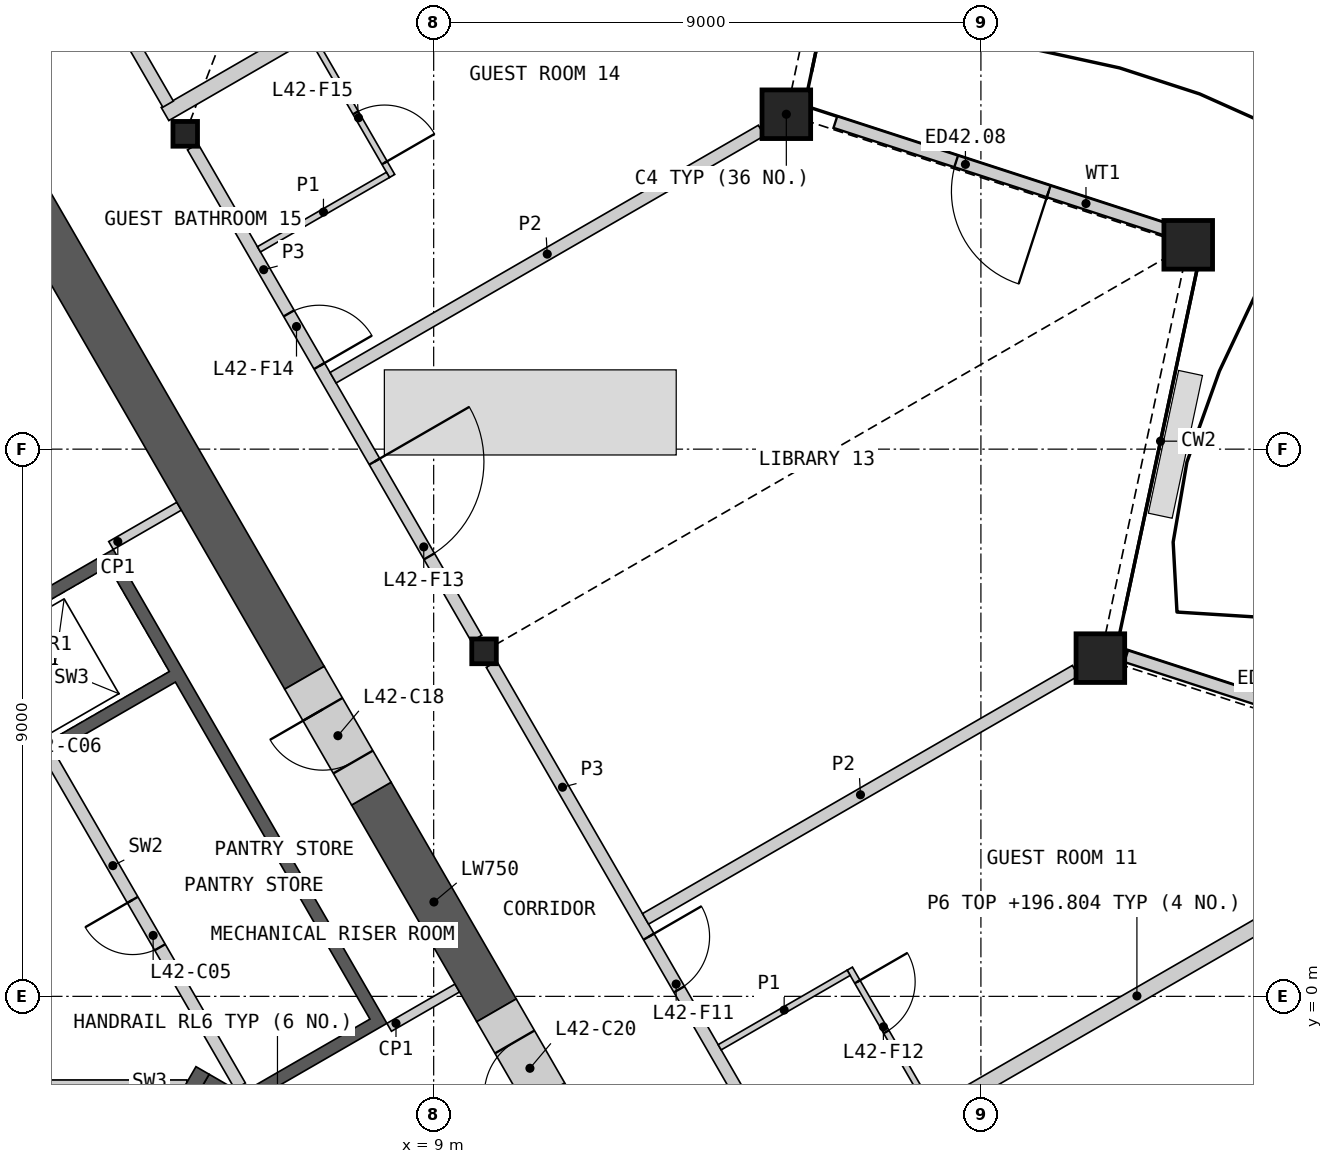
"""IFC4 building model, lengths in metres.
Left out: names, types, materials, properties, quantities, classifications, styles, units other than length and angle.
Written with IfcOpenShell. Run it as: python <this file> out.ifc"""

import sys

from ifc_helpers import new_model, si_unit, direction, frame, frame_2d, origin, origin_2d, place, context, subcontext, project, spatial, polyline, rectangle, hollow_rectangle, i_section, outline, extrude, element, fill, save


model = new_model("IFC4")
c1 = context("Model", 3, precision=1e-05, world=origin(), true_north=direction((0.0, 1.0)))
c2 = subcontext(c1, "Body", "Model", "MODEL_VIEW")
j1 = project(units=[si_unit("LENGTHUNIT", "METRE"), si_unit("PLANEANGLEUNIT", "RADIAN")], contexts=[c1])
p1 = place(None, origin())
s1 = spatial("IfcSite", under=j1, at=p1, CompositionType="ELEMENT")
p2 = place(p1, origin())
s2 = spatial("IfcBuilding", under=s1, at=p2, CompositionType="ELEMENT")
p3 = place(p2, frame((0.0, 0.0, 194.4)))
s3 = spatial("IfcBuildingStorey", under=s2, at=p3, CompositionType="ELEMENT", Elevation=194.4)
for number, where, z_axis, x_axis in (
    (1, (19.965, 5.563, 0.0), (0.0, 0.0, 1.0), (1.0, 0.0, 0.0)),
    (2, (21.409, 12.361, 0.0), (0.0, 0.0, 1.0), (1.0, 0.0, 0.0)),
    (3, (14.8, 14.508, 0.0), (0.0, 0.0, 1.0), (1.0, 0.0, 0.0)),
):
    element("IfcColumn", number, at=place(p3, frame(where, z_axis=z_axis, x_axis=x_axis)), inside=s3, PredefinedType="COLUMN", context=c2, shape_type="SweptSolid", body=[
        extrude(hollow_rectangle(XDim=0.8, YDim=0.8, WallThickness=0.05, at=origin_2d()), origin(), (0.0, 0.0, 1.0), 3.6),
    ])
for number, where, z_axis, x_axis in (
    (4, (9.828, 5.675, 0.0), (0.0, 0.0, 1.0), (1.0, 0.0, 0.0)),
    (5, (4.914, 14.186, 0.0), (0.0, 0.0, 1.0), (1.0, 0.0, 0.0)),
):
    element("IfcColumn", number, at=place(p3, frame(where, z_axis=z_axis, x_axis=x_axis)), inside=s3, PredefinedType="COLUMN", context=c2, shape_type="SweptSolid", body=[
        extrude(i_section(OverallWidth=0.404, OverallDepth=0.407, WebThickness=0.027, FlangeThickness=0.044, at=origin_2d()), origin(), (0.0, 0.0, 1.0), 3.6),
    ])
p4 = place(p3, frame((26.24, 3.693, 0.0), z_axis=(0.0, 0.0, 1.0), x_axis=(-0.951053023356, 0.30902774433, 0.0)))
e6 = element("IfcWall", 6, at=p4, inside=s3, PredefinedType="SOLIDWALL", context=c2, shape_type="SweptSolid", body=[
    extrude(rectangle(XDim=6.152, YDim=0.2, at=frame_2d((3.076, 0.0))), origin(), (0.0, 0.0, 1.0), 2.701),
])
p5 = place(p4, frame((2.089, 0.0, 0.0)))
e7 = element("IfcOpeningElement", 7, at=p5, cuts=e6, PredefinedType="OPENING", context=c2, shape_type="SweptSolid", body=[
    extrude(rectangle(XDim=1.6, YDim=2.4, at=frame_2d((0.8, 1.2))), frame((0.0, 0.11, 0.0), z_axis=(0.0, -1.0, 0.0), x_axis=(1.0, 0.0, 0.0)), (0.0, 0.0, 1.0), 0.22),
])
p6 = place(p3, frame((21.102, 12.593, 0.0), z_axis=(0.0, 0.0, 1.0), x_axis=(-0.951059834965, 0.309006780371, 0.0)))
e8 = element("IfcWall", 8, at=p6, inside=s3, PredefinedType="SOLIDWALL", context=c2, shape_type="SweptSolid", body=[
    extrude(rectangle(XDim=5.779, YDim=0.2, at=frame_2d((2.889, 0.0))), origin(), (0.0, 0.0, 1.0), 2.701),
])
p7 = place(p6, frame((2.089, 0.0, 0.0)))
e9 = element("IfcOpeningElement", 9, at=p7, cuts=e8, PredefinedType="OPENING", context=c2, shape_type="SweptSolid", body=[
    extrude(rectangle(XDim=1.6, YDim=2.4, at=frame_2d((0.8, 1.2))), frame((0.0, 0.11, 0.0), z_axis=(0.0, -1.0, 0.0), x_axis=(1.0, 0.0, 0.0)), (0.0, 0.0, 1.0), 0.22),
])
p8 = place(p3, origin())
e10 = element("IfcWall", 10, at=p8, inside=s3, PredefinedType="SHEAR", context=c2, shape_type="SweptSolid", body=[
    extrude(outline(polyline([(1.561, 6.097), (3.731, 7.35), (8.231, -0.444), (6.061, -1.697), (5.96, -1.524), (7.952, -0.374), (4.752, 5.169), (2.76, 4.019), (2.66, 4.192), (4.652, 5.342), (3.652, 7.074), (1.66, 5.924), (1.561, 6.097)])), origin(), (0.0, 0.0, 1.0), 3.25),
])
p9 = place(p3, frame((5.817, -1.476, 0.0), z_axis=(0.0, 0.0, 1.0), x_axis=(-0.500002616675, 0.866023893041, 0.0)))
e11 = element("IfcWall", 11, at=p9, inside=s3, PredefinedType="SOLIDWALL", context=c2, shape_type="SweptSolid", body=[
    extrude(rectangle(XDim=8.373, YDim=0.2, at=frame_2d((4.187, 0.0))), origin(), (0.0, 0.0, 1.0), 3.25),
])
p10 = place(p9, frame((2.637, 0.0, 0.0)))
e12 = element("IfcOpeningElement", 12, at=p10, cuts=e11, PredefinedType="OPENING", context=c2, shape_type="SweptSolid", body=[
    extrude(rectangle(XDim=0.9, YDim=2.1, at=frame_2d((0.45, 1.05))), frame((0.0, 0.11, 0.0), z_axis=(0.0, -1.0, 0.0), x_axis=(1.0, 0.0, 0.0)), (0.0, 0.0, 1.0), 0.22),
])
p11 = place(p9, frame((6.937, 0.0, 0.0)))
e13 = element("IfcOpeningElement", 13, at=p11, cuts=e11, PredefinedType="OPENING", context=c2, shape_type="SweptSolid", body=[
    extrude(rectangle(XDim=1.1, YDim=2.1, at=frame_2d((0.55, 1.05))), frame((0.0, 0.11, 0.0), z_axis=(0.0, -1.0, 0.0), x_axis=(1.0, 0.0, 0.0)), (0.0, 0.0, 1.0), 0.22),
])
p12 = place(p3, frame((-4.941, -1.45, 0.0), z_axis=(0.0, 0.0, 1.0), x_axis=(1.0, 0.0, 0.0)))
e14 = element("IfcWall", 14, at=p12, inside=s3, PredefinedType="PARTITIONING", context=c2, shape_type="SweptSolid", body=[
    extrude(rectangle(XDim=9.882, YDim=0.15, at=frame_2d((4.941, 0.0))), origin(), (0.0, 0.0, 1.0), 3.25),
])
p13 = place(p12, frame((4.391, 0.0, 0.0)))
e15 = element("IfcOpeningElement", 15, at=p13, cuts=e14, PredefinedType="OPENING", context=c2, shape_type="SweptSolid", body=[
    extrude(rectangle(XDim=1.1, YDim=2.1, at=frame_2d((0.55, 1.05))), frame((0.0, 0.085, 0.0), z_axis=(0.0, -1.0, 0.0), x_axis=(1.0, 0.0, 0.0)), (0.0, 0.0, 1.0), 0.17),
])
p14 = place(p3, origin())
e16 = element("IfcWall", 16, at=p14, inside=s3, PredefinedType="SHEAR", context=c2, shape_type="SweptSolid", body=[
    extrude(outline(polyline([(10.032, -4.298), (10.374, -4.206), (5.307, -1.281), (5.182, -1.498), (10.032, -4.298)])), origin(), (0.0, 0.0, 1.0), 3.25),
])
p15 = place(p3, frame((3.655, -3.893, 0.0), z_axis=(0.0, 0.0, 1.0), x_axis=(0.499982516597, 0.866035497597, 0.0)))
e17 = element("IfcWall", 17, at=p15, inside=s3, PredefinedType="SHEAR", context=c2, shape_type="SweptSolid", body=[
    extrude(rectangle(XDim=3.088, YDim=0.25, at=frame_2d((1.544, 0.0))), origin(), (0.0, 0.0, 1.0), 3.25),
])
p16 = place(p15, frame((0.994, 0.0, 0.0)))
e18 = element("IfcOpeningElement", 18, at=p16, cuts=e17, PredefinedType="OPENING", context=c2, shape_type="SweptSolid", body=[
    extrude(rectangle(XDim=1.1, YDim=2.1, at=frame_2d((0.55, 1.05))), frame((0.0, 0.135, 0.0), z_axis=(0.0, -1.0, 0.0), x_axis=(1.0, 0.0, 0.0)), (0.0, 0.0, 1.0), 0.27),
])
for number, where, z_axis, x_axis in (
    (19, (3.693, 7.415, 0.0), (0.0, 0.0, 1.0), (0.866, 0.5, 0.0)),
    (20, (8.268, -0.509, 0.0), (0.0, 0.0, 1.0), (0.866, 0.5, 0.0)),
):
    element("IfcWall", number, at=place(p3, frame(where, z_axis=z_axis, x_axis=x_axis)), inside=s3, PredefinedType="PARTITIONING", context=c2, shape_type="SweptSolid", body=[
        extrude(rectangle(XDim=1.293, YDim=0.15, at=frame_2d((0.646, 0.0))), origin(), (0.0, 0.0, 1.0), 3.25),
    ])
p17 = place(p3, frame((6.875, 5.24, 0.0), z_axis=(0.0, 0.0, 1.0), x_axis=(-0.499997217876, 0.866027010039, 0.0)))
e21 = element("IfcWall", 21, at=p17, inside=s3, PredefinedType="SHEAR", context=c2, shape_type="SweptSolid", body=[
    extrude(rectangle(XDim=13.101, YDim=0.75, at=frame_2d((6.551, 0.0))), origin(), (0.0, 0.0, 1.0), 3.25),
])
p18 = place(p3, frame((10.033, -0.23, 0.0), z_axis=(0.0, 0.0, 1.0), x_axis=(-0.500030520673, 0.866007781949, 0.0)))
e22 = element("IfcWall", 22, at=p18, inside=s3, PredefinedType="SHEAR", context=c2, shape_type="SweptSolid", body=[
    extrude(rectangle(XDim=4.116, YDim=0.75, at=frame_2d((2.058, 0.0))), origin(), (0.0, 0.0, 1.0), 3.25),
])
p19 = place(p3, frame((7.975, 3.334, 0.0), z_axis=(0.0, 0.0, 1.0), x_axis=(-0.500077893725, 0.86598042715, 0.0)))
e23 = element("IfcWall", 23, at=p19, inside=s3, PredefinedType="SHEAR", context=c2, shape_type="SweptSolid", body=[
    extrude(rectangle(XDim=2.2, YDim=0.75, at=frame_2d((1.1, 0.0))), origin(), (0.0, 0.0, 1.0), 3.25),
])
p20 = place(p19, frame((0.6, 0.0, 0.0)))
e24 = element("IfcOpeningElement", 24, at=p20, cuts=e23, PredefinedType="OPENING", context=c2, shape_type="SweptSolid", body=[
    extrude(rectangle(XDim=1.0, YDim=2.1, at=frame_2d((0.5, 1.05))), frame((0.0, 0.385, 0.0), z_axis=(0.0, -1.0, 0.0), x_axis=(1.0, 0.0, 0.0)), (0.0, 0.0, 1.0), 0.77),
])
p21 = place(p3, frame((11.133, -2.135, 0.0), z_axis=(0.0, 0.0, 1.0), x_axis=(-0.499981787252, 0.866035918664, 0.0)))
e25 = element("IfcWall", 25, at=p21, inside=s3, PredefinedType="SHEAR", context=c2, shape_type="SweptSolid", body=[
    extrude(rectangle(XDim=2.2, YDim=0.75, at=frame_2d((1.1, 0.0))), origin(), (0.0, 0.0, 1.0), 3.25),
])
p22 = place(p21, frame((0.6, 0.0, 0.0)))
e26 = element("IfcOpeningElement", 26, at=p22, cuts=e25, PredefinedType="OPENING", context=c2, shape_type="SweptSolid", body=[
    extrude(rectangle(XDim=1.0, YDim=2.1, at=frame_2d((0.5, 1.05))), frame((0.0, 0.385, 0.0), z_axis=(0.0, -1.0, 0.0), x_axis=(1.0, 0.0, 0.0)), (0.0, 0.0, 1.0), 0.77),
])
p23 = place(p3, frame((14.967, -3.226, 0.0), z_axis=(0.0, 0.0, 1.0), x_axis=(0.866030250269, 0.499991605548, 0.0)))
e27 = element("IfcWall", 27, at=p23, inside=s3, PredefinedType="PARTITIONING", context=c2, shape_type="SweptSolid", body=[
    extrude(rectangle(XDim=12.929, YDim=0.25, at=frame_2d((6.465, 0.0))), origin(), (0.0, 0.0, 1.0), 2.404),
])
p24 = place(p3, frame((4.582, 14.512, 0.0), z_axis=(0.0, 0.0, 1.0), x_axis=(0.866027263711, 0.4999967785, 0.0)))
e28 = element("IfcWall", 28, at=p24, inside=s3, PredefinedType="PARTITIONING", context=c2, shape_type="SweptSolid", body=[
    extrude(rectangle(XDim=12.994, YDim=0.25, at=frame_2d((6.497, 0.0))), origin(), (0.0, 0.0, 1.0), 2.404),
])
p25 = place(p3, frame((5.038, 13.972, 0.0), z_axis=(0.0, 0.0, 1.0), x_axis=(0.50000393355, -0.866023132736, 0.0)))
e29 = element("IfcWall", 29, at=p25, inside=s3, PredefinedType="PARTITIONING", context=c2, shape_type="SweptSolid", body=[
    extrude(rectangle(XDim=9.335, YDim=0.2, at=frame_2d((4.667, 0.0))), origin(), (0.0, 0.0, 1.0), 3.25),
])
p26 = place(p25, frame((5.979, 0.0, 0.0)))
e30 = element("IfcOpeningElement", 30, at=p26, cuts=e29, PredefinedType="OPENING", context=c2, shape_type="SweptSolid", body=[
    extrude(rectangle(XDim=1.8, YDim=2.1, at=frame_2d((0.9, 1.05))), frame((0.0, 0.11, 0.0), z_axis=(0.0, -1.0, 0.0), x_axis=(1.0, 0.0, 0.0)), (0.0, 0.0, 1.0), 0.22),
])
p27 = place(p25, frame((3.163, 0.0, 0.0)))
e31 = element("IfcOpeningElement", 31, at=p27, cuts=e29, PredefinedType="OPENING", context=c2, shape_type="SweptSolid", body=[
    extrude(rectangle(XDim=1.0, YDim=2.1, at=frame_2d((0.5, 1.05))), frame((0.0, 0.11, 0.0), z_axis=(0.0, -1.0, 0.0), x_axis=(1.0, 0.0, 0.0)), (0.0, 0.0, 1.0), 0.22),
])
p28 = place(p3, frame((9.952, 5.461, 0.0), z_axis=(0.0, 0.0, 1.0), x_axis=(0.50000393355, -0.866023132736, 0.0)))
e32 = element("IfcWall", 32, at=p28, inside=s3, PredefinedType="PARTITIONING", context=c2, shape_type="SweptSolid", body=[
    extrude(rectangle(XDim=9.335, YDim=0.2, at=frame_2d((4.667, 0.0))), origin(), (0.0, 0.0, 1.0), 3.25),
])
p29 = place(p28, frame((5.172, 0.0, 0.0)))
e33 = element("IfcOpeningElement", 33, at=p29, cuts=e32, PredefinedType="OPENING", context=c2, shape_type="SweptSolid", body=[
    extrude(rectangle(XDim=1.0, YDim=2.1, at=frame_2d((0.5, 1.05))), frame((0.0, 0.11, 0.0), z_axis=(0.0, -1.0, 0.0), x_axis=(1.0, 0.0, 0.0)), (0.0, 0.0, 1.0), 0.22),
])
p30 = place(p3, frame((1.913, 19.385, 0.0), z_axis=(0.0, 0.0, 1.0), x_axis=(0.499972435384, -0.866041317638, 0.0)))
e34 = element("IfcWall", 34, at=p30, inside=s3, PredefinedType="PARTITIONING", context=c2, shape_type="SweptSolid", body=[
    extrude(rectangle(XDim=5.439, YDim=0.2, at=frame_2d((2.719, 0.0))), origin(), (0.0, 0.0, 1.0), 3.25),
])
p31 = place(p30, frame((0.351, 0.0, 0.0)))
e35 = element("IfcOpeningElement", 35, at=p31, cuts=e34, PredefinedType="OPENING", context=c2, shape_type="SweptSolid", body=[
    extrude(rectangle(XDim=1.1, YDim=2.1, at=frame_2d((0.55, 1.05))), frame((0.0, 0.11, 0.0), z_axis=(0.0, -1.0, 0.0), x_axis=(1.0, 0.0, 0.0)), (0.0, 0.0, 1.0), 0.22),
])
p32 = place(p3, frame((12.484, 1.274, 0.0), z_axis=(0.0, 0.0, 1.0), x_axis=(0.866026229868, 0.499998569178, 0.0)))
e36 = element("IfcWall", 36, at=p32, inside=s3, PredefinedType="PARTITIONING", context=c2, shape_type="SweptSolid", body=[
    extrude(rectangle(XDim=8.164, YDim=0.2, at=frame_2d((4.082, 0.0))), origin(), (0.0, 0.0, 1.0), 2.404),
])
p33 = place(p3, frame((7.346, 10.175, 0.0), z_axis=(0.0, 0.0, 1.0), x_axis=(0.86602913801, 0.499993532075, 0.0)))
e37 = element("IfcWall", 37, at=p33, inside=s3, PredefinedType="PARTITIONING", context=c2, shape_type="SweptSolid", body=[
    extrude(rectangle(XDim=8.134, YDim=0.2, at=frame_2d((4.067, 0.0))), origin(), (0.0, 0.0, 1.0), 2.404),
])
p34 = place(p3, frame((15.844, 0.456, 0.0), z_axis=(0.0, 0.0, 1.0), x_axis=(0.500006934395, -0.866021400173, 0.0)))
e38 = element("IfcWall", 38, at=p34, inside=s3, PredefinedType="PARTITIONING", context=c2, shape_type="SweptSolid", body=[
    extrude(rectangle(XDim=5.2, YDim=0.1, at=frame_2d((2.6, 0.0))), origin(), (0.0, 0.0, 1.0), 2.404),
])
p35 = place(p34, frame((4.0, 0.0, 0.0)))
e39 = element("IfcOpeningElement", 39, at=p35, cuts=e38, PredefinedType="OPENING", context=c2, shape_type="SweptSolid", body=[
    extrude(rectangle(XDim=0.95, YDim=2.1, at=frame_2d((0.475, 1.05))), frame((0.0, 0.06, 0.0), z_axis=(0.0, -1.0, 0.0), x_axis=(1.0, 0.0, 0.0)), (0.0, 0.0, 1.0), 0.12),
])
p36 = place(p34, frame((0.25, 0.0, 0.0)))
e40 = element("IfcOpeningElement", 40, at=p36, cuts=e38, PredefinedType="OPENING", context=c2, shape_type="SweptSolid", body=[
    extrude(rectangle(XDim=0.95, YDim=2.1, at=frame_2d((0.475, 1.05))), frame((0.0, 0.06, 0.0), z_axis=(0.0, -1.0, 0.0), x_axis=(1.0, 0.0, 0.0)), (0.0, 0.0, 1.0), 0.12),
])
p37 = place(p3, frame((5.717, 17.996, 0.0), z_axis=(0.0, 0.0, 1.0), x_axis=(0.500027264788, -0.866009661879, 0.0)))
e41 = element("IfcWall", 41, at=p37, inside=s3, PredefinedType="PARTITIONING", context=c2, shape_type="SweptSolid", body=[
    extrude(rectangle(XDim=5.2, YDim=0.1, at=frame_2d((2.6, 0.0))), origin(), (0.0, 0.0, 1.0), 2.404),
])
p38 = place(p37, frame((4.0, 0.0, 0.0)))
e42 = element("IfcOpeningElement", 42, at=p38, cuts=e41, PredefinedType="OPENING", context=c2, shape_type="SweptSolid", body=[
    extrude(rectangle(XDim=0.95, YDim=2.1, at=frame_2d((0.475, 1.05))), frame((0.0, 0.06, 0.0), z_axis=(0.0, -1.0, 0.0), x_axis=(1.0, 0.0, 0.0)), (0.0, 0.0, 1.0), 0.12),
])
p39 = place(p37, frame((0.25, 0.0, 0.0)))
e43 = element("IfcOpeningElement", 43, at=p39, cuts=e41, PredefinedType="OPENING", context=c2, shape_type="SweptSolid", body=[
    extrude(rectangle(XDim=0.95, YDim=2.1, at=frame_2d((0.475, 1.05))), frame((0.0, 0.06, 0.0), z_axis=(0.0, -1.0, 0.0), x_axis=(1.0, 0.0, 0.0)), (0.0, 0.0, 1.0), 0.12),
])
p40 = place(p3, frame((6.126, 12.286, 0.0), z_axis=(0.0, 0.0, 1.0), x_axis=(0.866014668023, 0.500018594424, 0.0)))
e44 = element("IfcWall", 44, at=p40, inside=s3, PredefinedType="PARTITIONING", context=c2, shape_type="SweptSolid", body=[
    extrude(rectangle(XDim=2.45, YDim=0.1, at=frame_2d((1.225, 0.0))), origin(), (0.0, 0.0, 1.0), 2.404),
])
p41 = place(p3, frame((13.704, -0.837, 0.0), z_axis=(0.0, 0.0, 1.0), x_axis=(0.865989751695, 0.500061746146, 0.0)))
e45 = element("IfcWall", 45, at=p41, inside=s3, PredefinedType="PARTITIONING", context=c2, shape_type="SweptSolid", body=[
    extrude(rectangle(XDim=2.45, YDim=0.1, at=frame_2d((1.225, 0.0))), origin(), (0.0, 0.0, 1.0), 2.404),
])
p42 = place(p7, origin())
e46 = element("IfcDoor", 46, at=p42, inside=s3, OperationType="DOUBLE_DOOR_SINGLE_SWING", PredefinedType="DOOR", context=c2, shape_type="SweptSolid", body=[
    extrude(rectangle(XDim=1.6, YDim=2.4, at=frame_2d((0.8, 1.2))), frame((0.0, 0.025, 0.0), z_axis=(0.0, -1.0, 0.0), x_axis=(1.0, 0.0, 0.0)), (0.0, 0.0, 1.0), 0.05),
])
fill(e9, e46)
p43 = place(p10, origin())
e47 = element("IfcDoor", 47, at=p43, inside=s3, OperationType="SINGLE_SWING_RIGHT", PredefinedType="DOOR", context=c2, shape_type="SweptSolid", body=[
    extrude(rectangle(XDim=0.9, YDim=2.1, at=frame_2d((0.45, 1.05))), frame((0.0, 0.025, 0.0), z_axis=(0.0, -1.0, 0.0), x_axis=(1.0, 0.0, 0.0)), (0.0, 0.0, 1.0), 0.05),
])
fill(e12, e47)
p44 = place(p20, origin())
e48 = element("IfcDoor", 48, at=p44, inside=s3, OperationType="SINGLE_SWING_RIGHT", PredefinedType="DOOR", context=c2, shape_type="SweptSolid", body=[
    extrude(rectangle(XDim=1.0, YDim=2.1, at=frame_2d((0.5, 1.05))), frame((0.0, 0.13, 0.0), z_axis=(0.0, -1.0, 0.0), x_axis=(1.0, 0.0, 0.0)), (0.0, 0.0, 1.0), 0.05),
])
fill(e24, e48)
p45 = place(p22, origin())
e49 = element("IfcDoor", 49, at=p45, inside=s3, OperationType="SINGLE_SWING_LEFT", PredefinedType="DOOR", context=c2, shape_type="SweptSolid", body=[
    extrude(rectangle(XDim=1.0, YDim=2.1, at=frame_2d((0.5, 1.05))), frame((0.0, 0.13, 0.0), z_axis=(0.0, -1.0, 0.0), x_axis=(1.0, 0.0, 0.0)), (0.0, 0.0, 1.0), 0.05),
])
fill(e26, e49)
p46 = place(p29, origin())
e50 = element("IfcDoor", 50, at=p46, inside=s3, OperationType="SINGLE_SWING_LEFT", PredefinedType="DOOR", context=c2, shape_type="SweptSolid", body=[
    extrude(rectangle(XDim=1.0, YDim=2.1, at=frame_2d((0.5, 1.05))), frame((0.0, 0.025, 0.0), z_axis=(0.0, -1.0, 0.0), x_axis=(1.0, 0.0, 0.0)), (0.0, 0.0, 1.0), 0.05),
])
fill(e33, e50)
p47 = place(p36, origin())
e51 = element("IfcDoor", 51, at=p47, inside=s3, OperationType="SINGLE_SWING_LEFT", PredefinedType="DOOR", context=c2, shape_type="SweptSolid", body=[
    extrude(rectangle(XDim=0.95, YDim=2.1, at=frame_2d((0.475, 1.05))), frame((0.0, 0.025, 0.0), z_axis=(0.0, -1.0, 0.0), x_axis=(1.0, 0.0, 0.0)), (0.0, 0.0, 1.0), 0.05),
])
fill(e40, e51)
p48 = place(p26, origin())
e52 = element("IfcDoor", 52, at=p48, inside=s3, OperationType="DOUBLE_DOOR_SINGLE_SWING", PredefinedType="DOOR", context=c2, shape_type="SweptSolid", body=[
    extrude(rectangle(XDim=1.8, YDim=2.1, at=frame_2d((0.9, 1.05))), frame((0.0, 0.025, 0.0), z_axis=(0.0, -1.0, 0.0), x_axis=(1.0, 0.0, 0.0)), (0.0, 0.0, 1.0), 0.05),
])
fill(e30, e52)
p49 = place(p27, origin())
e53 = element("IfcDoor", 53, at=p49, inside=s3, OperationType="SINGLE_SWING_RIGHT", PredefinedType="DOOR", context=c2, shape_type="SweptSolid", body=[
    extrude(rectangle(XDim=1.0, YDim=2.1, at=frame_2d((0.5, 1.05))), frame((0.0, 0.025, 0.0), z_axis=(0.0, -1.0, 0.0), x_axis=(1.0, 0.0, 0.0)), (0.0, 0.0, 1.0), 0.05),
])
fill(e31, e53)
p50 = place(p38, origin())
e54 = element("IfcDoor", 54, at=p50, inside=s3, OperationType="SINGLE_SWING_RIGHT", PredefinedType="DOOR", context=c2, shape_type="SweptSolid", body=[
    extrude(rectangle(XDim=0.95, YDim=2.1, at=frame_2d((0.475, 1.05))), frame((0.0, 0.025, 0.0), z_axis=(0.0, -1.0, 0.0), x_axis=(1.0, 0.0, 0.0)), (0.0, 0.0, 1.0), 0.05),
])
fill(e42, e54)
save(model, sys.argv[1])
